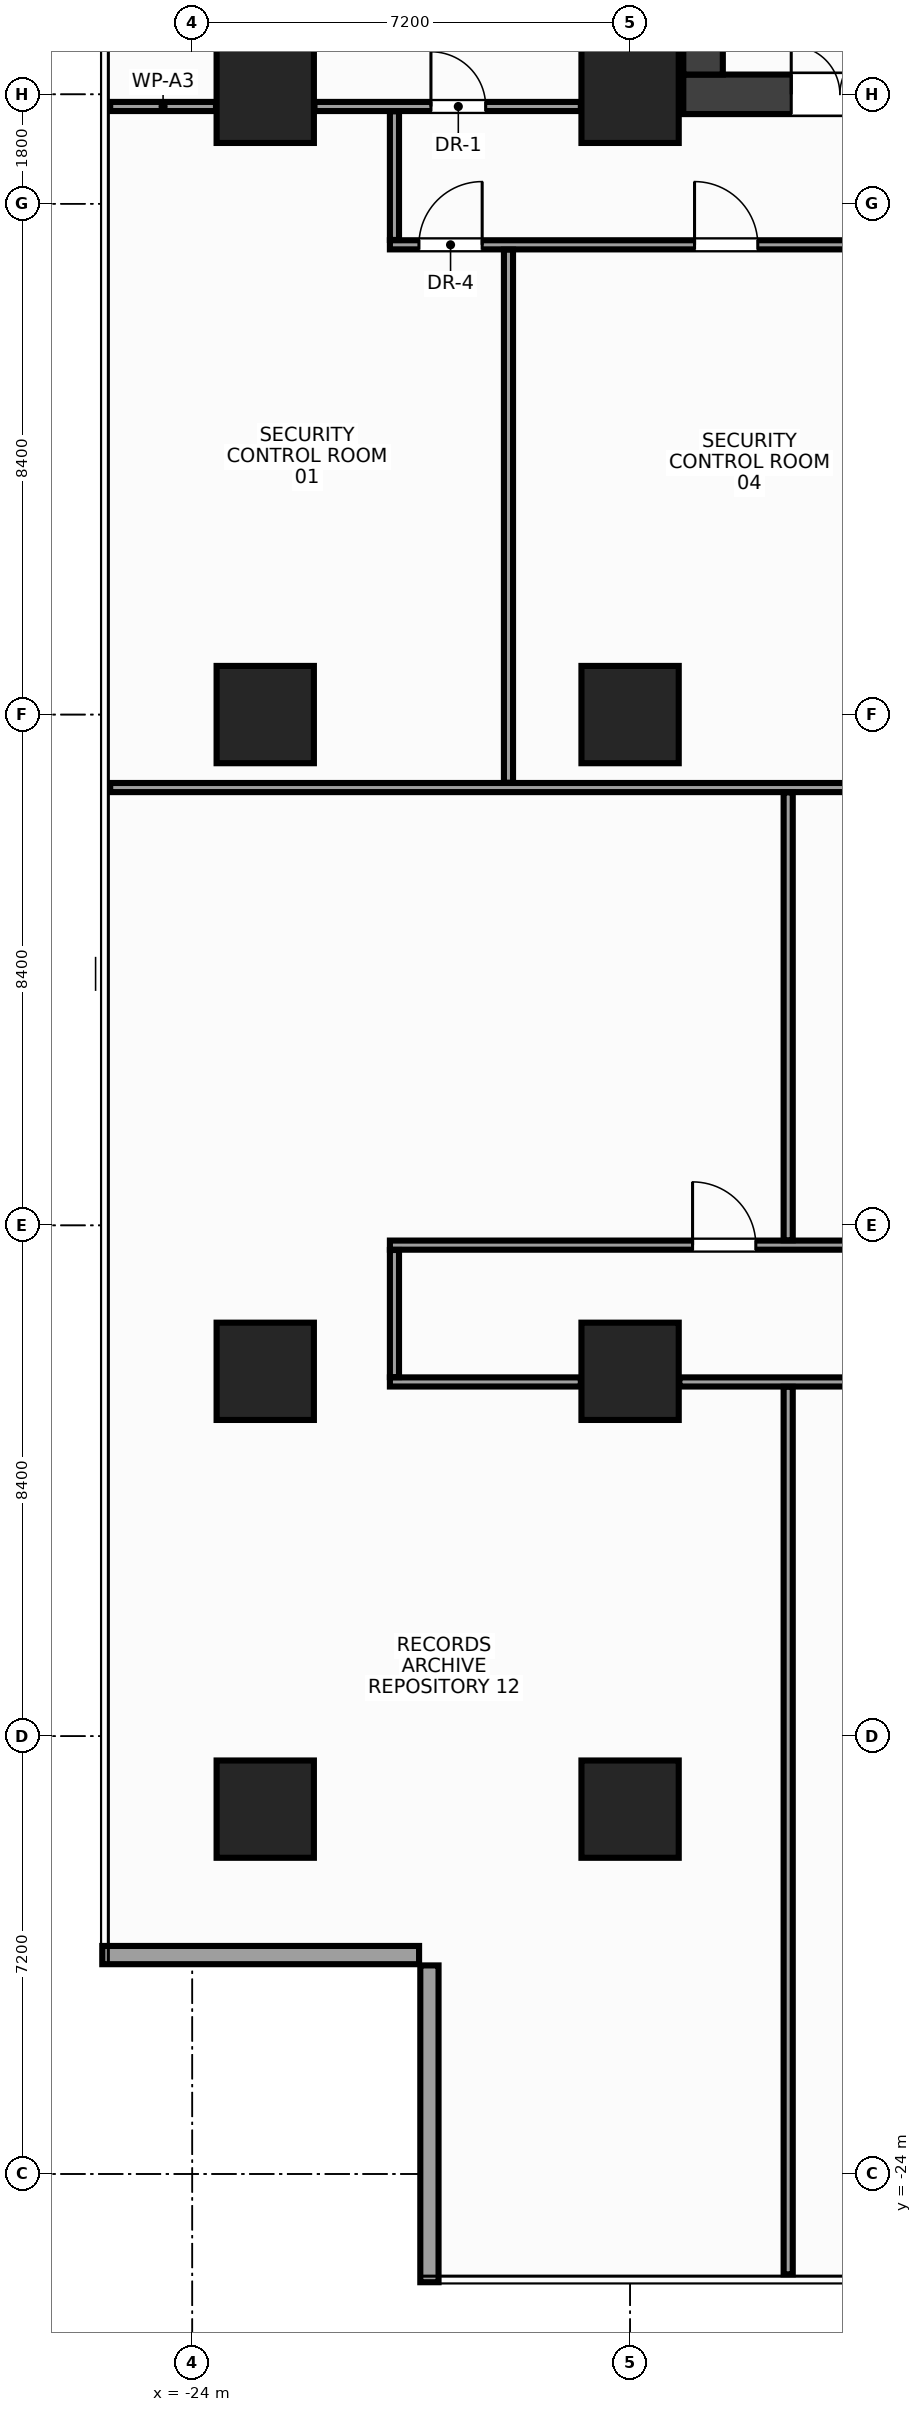
"""IFC4 building model, lengths in metres.
Left out: names, types, materials, properties, quantities, classifications, styles, units other than length and angle.
Written with IfcOpenShell. Run it as: python <this file> out.ifc"""

import sys

from ifc_helpers import new_model, si_unit, direction, frame, frame_2d, origin, origin_2d, place, context, subcontext, project, spatial, rectangle, extrude, source, transform, mapped, element, fill, save


model = new_model("IFC4")
c1 = context("Model", 3, precision=1e-05, world=origin(), true_north=direction((0.0, 1.0)))
c2 = subcontext(c1, "Body", "Model", "MODEL_VIEW")
j1 = project(units=[si_unit("LENGTHUNIT", "METRE"), si_unit("PLANEANGLEUNIT", "RADIAN")], contexts=[c1])
p1 = place(None, origin())
s1 = spatial("IfcSite", under=j1, at=p1, CompositionType="ELEMENT")
p2 = place(p1, origin())
s2 = spatial("IfcBuilding", under=s1, at=p2, CompositionType="ELEMENT")
p3 = place(p2, frame((0.0, 0.0, 92.0)))
s3 = spatial("IfcBuildingStorey", under=s2, at=p3, CompositionType="ELEMENT", Elevation=92.0)
m1 = source(origin(), c2, "Body", "SweptSolid", [
    extrude(rectangle(XDim=31.85, YDim=0.65, at=frame_2d((15.925, 0.0))), origin(), (0.0, 0.0, 1.0), 3.6),
])
p4 = place(p3, frame((-15.925, 10.2, 0.0), z_axis=(0.0, 0.0, 1.0), x_axis=(1.0, 0.0, 0.0)))
e1 = element("IfcWall", 1, at=p4, inside=s3, PredefinedType="SHEAR", context=c2, shape_type="MappedRepresentation", body=[
    mapped(m1, transform((0.0, 0.0, 0.0), x_axis=(1.0, 0.0, 0.0), y_axis=(0.0, 1.0, 0.0), z_axis=(0.0, 0.0, 1.0), scale=1.0)),
])
p5 = place(p4, frame((1.775, 0.0, 0.0)))
e2 = element("IfcOpeningElement", 2, at=p5, cuts=e1, PredefinedType="OPENING", context=c2, shape_type="SweptSolid", body=[
    extrude(rectangle(XDim=1.6, YDim=2.15, at=frame_2d((0.8, 1.075))), frame((0.0, 0.337, 0.0), z_axis=(0.0, -1.0, 0.0), x_axis=(1.0, 0.0, 0.0)), (0.0, 0.0, 1.0), 0.674),
])
p6 = place(p4, frame((28.475, 0.0, 0.0)))
e3 = element("IfcOpeningElement", 3, at=p6, cuts=e1, PredefinedType="OPENING", context=c2, shape_type="SweptSolid", body=[
    extrude(rectangle(XDim=1.6, YDim=2.15, at=frame_2d((0.8, 1.075))), frame((0.0, 0.337, 0.0), z_axis=(0.0, -1.0, 0.0), x_axis=(1.0, 0.0, 0.0)), (0.0, 0.0, 1.0), 0.674),
])
p7 = place(p4, frame((15.175, 0.0, 0.0)))
e4 = element("IfcOpeningElement", 4, at=p7, cuts=e1, PredefinedType="OPENING", context=c2, shape_type="SweptSolid", body=[
    extrude(rectangle(XDim=1.5, YDim=2.2, at=frame_2d((0.75, 1.1))), frame((0.0, 0.337, 0.0), z_axis=(0.0, -1.0, 0.0), x_axis=(1.0, 0.0, 0.0)), (0.0, 0.0, 1.0), 0.674),
])
m2 = source(origin(), c2, "Body", "SweptSolid", [
    extrude(rectangle(XDim=12.95, YDim=0.65, at=frame_2d((6.475, 0.0))), origin(), (0.0, 0.0, 1.0), 3.6),
])
p8 = place(p3, frame((-15.6, 10.525, 0.0), z_axis=(0.0, 0.0, 1.0), x_axis=(0.0, 1.0, 0.0)))
e5 = element("IfcWall", 5, at=p8, inside=s3, PredefinedType="SHEAR", context=c2, shape_type="MappedRepresentation", body=[
    mapped(m2, transform((0.0, 0.0, 0.0), x_axis=(1.0, 0.0, 0.0), y_axis=(0.0, 1.0, 0.0), z_axis=(0.0, 0.0, 1.0), scale=1.0)),
])
m3 = source(origin(), c2, "Body", "SweptSolid", [
    extrude(rectangle(XDim=1.6, YDim=1.6, at=origin_2d()), origin(), (0.0, 0.0, 1.0), 3.6),
])
for number, where, z_axis, x_axis in (
    (6, (-16.8, -18.0, 0.0), (0.0, 0.0, 1.0), (1.0, 0.0, 0.0)),
    (7, (-16.8, -10.8, 0.0), (0.0, 0.0, 1.0), (1.0, 0.0, 0.0)),
    (8, (-16.8, 0.0, 0.0), (0.0, 0.0, 1.0), (1.0, 0.0, 0.0)),
    (9, (-16.8, 10.2, 0.0), (0.0, 0.0, 1.0), (1.0, 0.0, 0.0)),
    (10, (-22.8, -18.0, 0.0), (0.0, 0.0, 1.0), (1.0, 0.0, 0.0)),
    (11, (-22.8, -10.8, 0.0), (0.0, 0.0, 1.0), (1.0, 0.0, 0.0)),
    (12, (-22.8, 0.0, 0.0), (0.0, 0.0, 1.0), (1.0, 0.0, 0.0)),
    (13, (-22.8, 10.2, 0.0), (0.0, 0.0, 1.0), (1.0, 0.0, 0.0)),
):
    element("IfcColumn", number, at=place(p3, frame(where, z_axis=z_axis, x_axis=x_axis)), inside=s3, PredefinedType="COLUMN", context=c2, shape_type="MappedRepresentation", body=[
        mapped(m3, transform((0.0, 0.0, 0.0), x_axis=(1.0, 0.0, 0.0), y_axis=(0.0, 1.0, 0.0), z_axis=(0.0, 0.0, 1.0), scale=1.0)),
    ])
m4 = source(origin(), c2, "Body", "SweptSolid", [
    extrude(rectangle(XDim=5.21, YDim=0.3, at=frame_2d((2.605, 0.0))), origin(), (0.0, 0.0, 1.0), 2.74),
])
for number, where, z_axis, x_axis in (
    (14, (-25.48, -20.4, 0.0), (0.0, 0.0, 1.0), (1.0, 0.0, 0.0)),
    (15, (-20.1, -20.57, 0.0), (0.0, 0.0, 1.0), (0.0, -1.0, 0.0)),
):
    element("IfcWall", number, at=place(p3, frame(where, z_axis=z_axis, x_axis=x_axis)), inside=s3, PredefinedType="STANDARD", context=c2, shape_type="MappedRepresentation", body=[
        mapped(m4, transform((0.0, 0.0, 0.0), x_axis=(1.0, 0.0, 0.0), y_axis=(0.0, 1.0, 0.0), z_axis=(0.0, 0.0, 1.0), scale=1.0)),
    ])
m5 = source(origin(), c2, "Body", "SweptSolid", [
    extrude(rectangle(XDim=1.74, YDim=0.15, at=frame_2d((0.87, 0.0))), origin(), (0.0, 0.0, 1.0), 3.36),
])
p9 = place(p3, frame((-25.35, 10.0, 0.0), z_axis=(0.0, 0.0, 1.0), x_axis=(1.0, 0.0, 0.0)))
e16 = element("IfcWall", 16, at=p9, inside=s3, PredefinedType="PARTITIONING", context=c2, shape_type="MappedRepresentation", body=[
    mapped(m5, transform((0.0, 0.0, 0.0), x_axis=(1.0, 0.0, 0.0), y_axis=(0.0, 1.0, 0.0), z_axis=(0.0, 0.0, 1.0), scale=1.0)),
])
m6 = source(origin(), c2, "Body", "SweptSolid", [
    extrude(rectangle(XDim=4.38, YDim=0.15, at=frame_2d((2.19, 0.0))), origin(), (0.0, 0.0, 1.0), 2.745),
])
p10 = place(p3, frame((-21.99, 10.0, 0.0), z_axis=(0.0, 0.0, 1.0), x_axis=(1.0, 0.0, 0.0)))
e17 = element("IfcWall", 17, at=p10, inside=s3, PredefinedType="PARTITIONING", context=c2, shape_type="MappedRepresentation", body=[
    mapped(m6, transform((0.0, 0.0, 0.0), x_axis=(1.0, 0.0, 0.0), y_axis=(0.0, 1.0, 0.0), z_axis=(0.0, 0.0, 1.0), scale=1.0)),
])
p11 = place(p10, frame((1.915, 0.0, 0.0)))
e18 = element("IfcOpeningElement", 18, at=p11, cuts=e17, PredefinedType="OPENING", context=c2, shape_type="SweptSolid", body=[
    extrude(rectangle(XDim=0.9, YDim=2.15, at=frame_2d((0.45, 1.075))), frame((0.0, 0.087, 0.0), z_axis=(0.0, -1.0, 0.0), x_axis=(1.0, 0.0, 0.0)), (0.0, 0.0, 1.0), 0.174),
])
m7 = source(origin(), c2, "Body", "SweptSolid", [
    extrude(rectangle(XDim=16.8, YDim=0.15, at=frame_2d((8.4, 0.0))), origin(), (0.0, 0.0, 1.0), 2.745),
])
p12 = place(p3, frame((-20.75, 7.725, 0.0), z_axis=(0.0, 0.0, 1.0), x_axis=(1.0, 0.0, 0.0)))
e19 = element("IfcWall", 19, at=p12, inside=s3, PredefinedType="PARTITIONING", context=c2, shape_type="MappedRepresentation", body=[
    mapped(m7, transform((0.0, 0.0, 0.0), x_axis=(1.0, 0.0, 0.0), y_axis=(0.0, 1.0, 0.0), z_axis=(0.0, 0.0, 1.0), scale=1.0)),
])
p13 = place(p12, frame((0.478, 0.0, 0.0)))
e20 = element("IfcOpeningElement", 20, at=p13, cuts=e19, PredefinedType="OPENING", context=c2, shape_type="SweptSolid", body=[
    extrude(rectangle(XDim=1.04, YDim=2.2, at=frame_2d((0.52, 1.1))), frame((0.0, 0.087, 0.0), z_axis=(0.0, -1.0, 0.0), x_axis=(1.0, 0.0, 0.0)), (0.0, 0.0, 1.0), 0.174),
])
p14 = place(p12, frame((5.01, 0.0, 0.0)))
e21 = element("IfcOpeningElement", 21, at=p14, cuts=e19, PredefinedType="OPENING", context=c2, shape_type="SweptSolid", body=[
    extrude(rectangle(XDim=1.04, YDim=2.2, at=frame_2d((0.52, 1.1))), frame((0.0, 0.087, 0.0), z_axis=(0.0, -1.0, 0.0), x_axis=(1.0, 0.0, 0.0)), (0.0, 0.0, 1.0), 0.174),
])
p15 = place(p12, frame((12.53, 0.0, 0.0)))
e22 = element("IfcOpeningElement", 22, at=p15, cuts=e19, PredefinedType="OPENING", context=c2, shape_type="SweptSolid", body=[
    extrude(rectangle(XDim=1.04, YDim=2.2, at=frame_2d((0.52, 1.1))), frame((0.0, 0.087, 0.0), z_axis=(0.0, -1.0, 0.0), x_axis=(1.0, 0.0, 0.0)), (0.0, 0.0, 1.0), 0.174),
])
p16 = place(p3, frame((-20.75, -8.725, 0.0), z_axis=(0.0, 0.0, 1.0), x_axis=(1.0, 0.0, 0.0)))
e23 = element("IfcWall", 23, at=p16, inside=s3, PredefinedType="PARTITIONING", context=c2, shape_type="MappedRepresentation", body=[
    mapped(m7, transform((0.0, 0.0, 0.0), x_axis=(1.0, 0.0, 0.0), y_axis=(0.0, 1.0, 0.0), z_axis=(0.0, 0.0, 1.0), scale=1.0)),
])
p17 = place(p16, frame((11.133, 0.0, 0.0)))
e24 = element("IfcOpeningElement", 24, at=p17, cuts=e23, PredefinedType="OPENING", context=c2, shape_type="SweptSolid", body=[
    extrude(rectangle(XDim=1.04, YDim=2.2, at=frame_2d((0.52, 1.1))), frame((0.0, 0.087, 0.0), z_axis=(0.0, -1.0, 0.0), x_axis=(1.0, 0.0, 0.0)), (0.0, 0.0, 1.0), 0.174),
])
p18 = place(p16, frame((4.978, 0.0, 0.0)))
e25 = element("IfcOpeningElement", 25, at=p18, cuts=e23, PredefinedType="OPENING", context=c2, shape_type="SweptSolid", body=[
    extrude(rectangle(XDim=1.04, YDim=2.2, at=frame_2d((0.52, 1.1))), frame((0.0, 0.087, 0.0), z_axis=(0.0, -1.0, 0.0), x_axis=(1.0, 0.0, 0.0)), (0.0, 0.0, 1.0), 0.174),
])
m8 = source(origin(), c2, "Body", "SweptSolid", [
    extrude(rectangle(XDim=3.14, YDim=0.15, at=frame_2d((1.57, 0.0))), origin(), (0.0, 0.0, 1.0), 2.745),
])
p19 = place(p3, frame((-20.75, -10.975, 0.0), z_axis=(0.0, 0.0, 1.0), x_axis=(1.0, 0.0, 0.0)))
e26 = element("IfcWall", 26, at=p19, inside=s3, PredefinedType="PARTITIONING", context=c2, shape_type="MappedRepresentation", body=[
    mapped(m8, transform((0.0, 0.0, 0.0), x_axis=(1.0, 0.0, 0.0), y_axis=(0.0, 1.0, 0.0), z_axis=(0.0, 0.0, 1.0), scale=1.0)),
])
m9 = source(origin(), c2, "Body", "SweptSolid", [
    extrude(rectangle(XDim=7.08, YDim=0.15, at=frame_2d((3.54, 0.0))), origin(), (0.0, 0.0, 1.0), 2.745),
])
p20 = place(p3, frame((-15.99, -10.975, 0.0), z_axis=(0.0, 0.0, 1.0), x_axis=(1.0, 0.0, 0.0)))
e27 = element("IfcWall", 27, at=p20, inside=s3, PredefinedType="PARTITIONING", context=c2, shape_type="MappedRepresentation", body=[
    mapped(m9, transform((0.0, 0.0, 0.0), x_axis=(1.0, 0.0, 0.0), y_axis=(0.0, 1.0, 0.0), z_axis=(0.0, 0.0, 1.0), scale=1.0)),
])
p21 = place(p20, frame((3.232, 0.0, 0.0)))
e28 = element("IfcOpeningElement", 28, at=p21, cuts=e27, PredefinedType="OPENING", context=c2, shape_type="SweptSolid", body=[
    extrude(rectangle(XDim=1.04, YDim=2.2, at=frame_2d((0.52, 1.1))), frame((0.0, 0.087, 0.0), z_axis=(0.0, -1.0, 0.0), x_axis=(1.0, 0.0, 0.0)), (0.0, 0.0, 1.0), 0.174),
])
m10 = source(origin(), c2, "Body", "SweptSolid", [
    extrude(rectangle(XDim=2.115, YDim=0.15, at=frame_2d((1.058, 0.0))), origin(), (0.0, 0.0, 1.0), 3.36),
])
p22 = place(p3, frame((-20.675, 7.805, 0.0), z_axis=(0.0, 0.0, 1.0), x_axis=(0.0, 1.0, 0.0)))
e29 = element("IfcWall", 29, at=p22, inside=s3, PredefinedType="PARTITIONING", context=c2, shape_type="MappedRepresentation", body=[
    mapped(m10, transform((0.0, 0.0, 0.0), x_axis=(1.0, 0.0, 0.0), y_axis=(0.0, 1.0, 0.0), z_axis=(0.0, 0.0, 1.0), scale=1.0)),
])
m11 = source(origin(), c2, "Body", "SweptSolid", [
    extrude(rectangle(XDim=2.09, YDim=0.15, at=frame_2d((1.045, 0.0))), origin(), (0.0, 0.0, 1.0), 3.36),
])
p23 = place(p3, frame((-20.675, -10.895, 0.0), z_axis=(0.0, 0.0, 1.0), x_axis=(0.0, 1.0, 0.0)))
e30 = element("IfcWall", 30, at=p23, inside=s3, PredefinedType="PARTITIONING", context=c2, shape_type="MappedRepresentation", body=[
    mapped(m11, transform((0.0, 0.0, 0.0), x_axis=(1.0, 0.0, 0.0), y_axis=(0.0, 1.0, 0.0), z_axis=(0.0, 0.0, 1.0), scale=1.0)),
])
m12 = source(origin(), c2, "Body", "SweptSolid", [
    extrude(rectangle(XDim=21.395, YDim=0.15, at=frame_2d((10.698, 0.0))), origin(), (0.0, 0.0, 1.0), 2.745),
])
p24 = place(p3, frame((-25.35, -1.2, 0.0), z_axis=(0.0, 0.0, 1.0), x_axis=(1.0, 0.0, 0.0)))
e31 = element("IfcWall", 31, at=p24, inside=s3, PredefinedType="PARTITIONING", context=c2, shape_type="MappedRepresentation", body=[
    mapped(m12, transform((0.0, 0.0, 0.0), x_axis=(1.0, 0.0, 0.0), y_axis=(0.0, 1.0, 0.0), z_axis=(0.0, 0.0, 1.0), scale=1.0)),
])
m13 = source(origin(), c2, "Body", "SweptSolid", [
    extrude(rectangle(XDim=8.765, YDim=0.15, at=frame_2d((4.383, 0.0))), origin(), (0.0, 0.0, 1.0), 2.745),
])
p25 = place(p3, frame((-18.8, -1.12, 0.0), z_axis=(0.0, 0.0, 1.0), x_axis=(0.0, 1.0, 0.0)))
e32 = element("IfcWall", 32, at=p25, inside=s3, PredefinedType="PARTITIONING", context=c2, shape_type="MappedRepresentation", body=[
    mapped(m13, transform((0.0, 0.0, 0.0), x_axis=(1.0, 0.0, 0.0), y_axis=(0.0, 1.0, 0.0), z_axis=(0.0, 0.0, 1.0), scale=1.0)),
])
m14 = source(origin(), c2, "Body", "SweptSolid", [
    extrude(rectangle(XDim=14.595, YDim=0.15, at=frame_2d((7.297, 0.0))), origin(), (0.0, 0.0, 1.0), 2.745),
])
p26 = place(p3, frame((-14.2, -25.65, 0.0), z_axis=(0.0, 0.0, 1.0), x_axis=(0.0, 1.0, 0.0)))
e33 = element("IfcWall", 33, at=p26, inside=s3, PredefinedType="PARTITIONING", context=c2, shape_type="MappedRepresentation", body=[
    mapped(m14, transform((0.0, 0.0, 0.0), x_axis=(1.0, 0.0, 0.0), y_axis=(0.0, 1.0, 0.0), z_axis=(0.0, 0.0, 1.0), scale=1.0)),
])
m15 = source(origin(), c2, "Body", "SweptSolid", [
    extrude(rectangle(XDim=7.365, YDim=0.15, at=frame_2d((3.683, 0.0))), origin(), (0.0, 0.0, 1.0), 3.36),
])
p27 = place(p3, frame((-14.2, -8.645, 0.0), z_axis=(0.0, 0.0, 1.0), x_axis=(0.0, 1.0, 0.0)))
e34 = element("IfcWall", 34, at=p27, inside=s3, PredefinedType="PARTITIONING", context=c2, shape_type="MappedRepresentation", body=[
    mapped(m15, transform((0.0, 0.0, 0.0), x_axis=(1.0, 0.0, 0.0), y_axis=(0.0, 1.0, 0.0), z_axis=(0.0, 0.0, 1.0), scale=1.0)),
])
m16 = source(origin(), c2, "Body", "SweptSolid", [
    extrude(rectangle(XDim=1.6, YDim=2.15, at=frame_2d((0.8, 1.075))), frame((0.0, 0.025, 0.0), z_axis=(0.0, -1.0, 0.0), x_axis=(1.0, 0.0, 0.0)), (0.0, 0.0, 1.0), 0.05),
])
p28 = place(p5, origin())
e35 = element("IfcDoor", 35, at=p28, inside=s3, OperationType="DOUBLE_DOOR_SINGLE_SWING", PredefinedType="DOOR", context=c2, shape_type="MappedRepresentation", body=[
    mapped(m16, transform((0.0, 0.0, 0.0), x_axis=(1.0, 0.0, 0.0), y_axis=(0.0, 1.0, 0.0), z_axis=(0.0, 0.0, 1.0), scale=1.0)),
])
fill(e2, e35)
m17 = source(origin(), c2, "Body", "SweptSolid", [
    extrude(rectangle(XDim=0.9, YDim=2.15, at=frame_2d((0.45, 1.075))), frame((0.0, 0.025, 0.0), z_axis=(0.0, -1.0, 0.0), x_axis=(1.0, 0.0, 0.0)), (0.0, 0.0, 1.0), 0.05),
])
p29 = place(p11, origin())
e36 = element("IfcDoor", 36, at=p29, inside=s3, OperationType="SINGLE_SWING_LEFT", PredefinedType="DOOR", context=c2, shape_type="MappedRepresentation", body=[
    mapped(m17, transform((0.0, 0.0, 0.0), x_axis=(1.0, 0.0, 0.0), y_axis=(0.0, 1.0, 0.0), z_axis=(0.0, 0.0, 1.0), scale=1.0)),
])
fill(e18, e36)
m18 = source(origin(), c2, "Body", "SweptSolid", [
    extrude(rectangle(XDim=1.04, YDim=2.2, at=frame_2d((0.52, 1.1))), frame((0.0, 0.025, 0.0), z_axis=(0.0, -1.0, 0.0), x_axis=(1.0, 0.0, 0.0)), (0.0, 0.0, 1.0), 0.05),
])
p30 = place(p13, origin())
e37 = element("IfcDoor", 37, at=p30, inside=s3, OperationType="SINGLE_SWING_RIGHT", PredefinedType="DOOR", context=c2, shape_type="MappedRepresentation", body=[
    mapped(m18, transform((0.0, 0.0, 0.0), x_axis=(1.0, 0.0, 0.0), y_axis=(0.0, 1.0, 0.0), z_axis=(0.0, 0.0, 1.0), scale=1.0)),
])
fill(e20, e37)
p31 = place(p14, origin())
e38 = element("IfcDoor", 38, at=p31, inside=s3, OperationType="SINGLE_SWING_LEFT", PredefinedType="DOOR", context=c2, shape_type="MappedRepresentation", body=[
    mapped(m18, transform((0.0, 0.0, 0.0), x_axis=(1.0, 0.0, 0.0), y_axis=(0.0, 1.0, 0.0), z_axis=(0.0, 0.0, 1.0), scale=1.0)),
])
fill(e21, e38)
p32 = place(p18, origin())
e39 = element("IfcDoor", 39, at=p32, inside=s3, OperationType="SINGLE_SWING_LEFT", PredefinedType="DOOR", context=c2, shape_type="MappedRepresentation", body=[
    mapped(m18, transform((0.0, 0.0, 0.0), x_axis=(1.0, 0.0, 0.0), y_axis=(0.0, 1.0, 0.0), z_axis=(0.0, 0.0, 1.0), scale=1.0)),
])
fill(e25, e39)
save(model, sys.argv[1])
